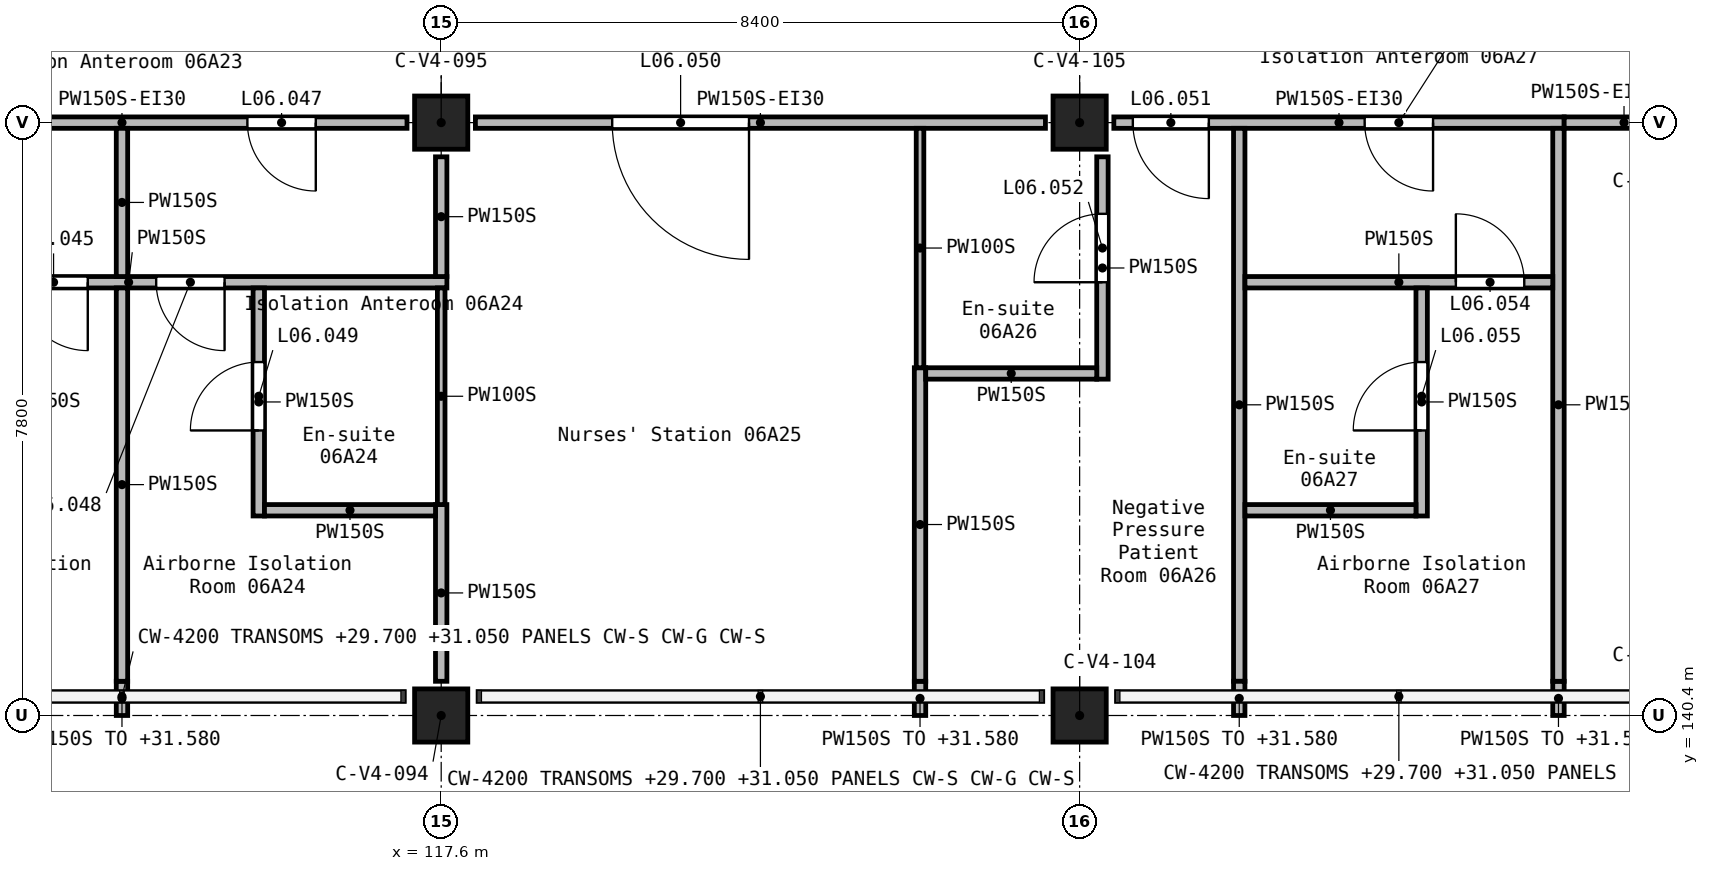
"""IFC4 building model, lengths in metres.
Left out: names, types, materials, properties, quantities, classifications, styles, units other than length and angle.
Written with IfcOpenShell. Run it as: python <this file> out.ifc"""

import sys

from ifc_helpers import new_model, si_unit, direction, frame, frame_2d, origin, origin_2d, place, context, subcontext, project, spatial, rectangle, extrude, element, fill, save


model = new_model("IFC4")
c1 = context("Model", 3, precision=1e-05, world=origin(), true_north=direction((0.0, 1.0)))
c2 = subcontext(c1, "Body", "Model", "MODEL_VIEW")
j1 = project(units=[si_unit("LENGTHUNIT", "METRE"), si_unit("PLANEANGLEUNIT", "RADIAN")], contexts=[c1])
p1 = place(None, origin())
s1 = spatial("IfcSite", under=j1, at=p1, CompositionType="ELEMENT")
p2 = place(p1, origin())
s2 = spatial("IfcBuilding", under=s1, at=p2, CompositionType="ELEMENT")
p3 = place(p2, frame((0.0, 0.0, 28.8)))
s3 = spatial("IfcBuildingStorey", under=s2, at=p3, CompositionType="ELEMENT", Elevation=28.8)
for number, where, z_axis, x_axis in (
    (1, (117.6, 140.4, 0.0), (0.0, 0.0, 1.0), (1.0, 0.0, 0.0)),
    (2, (117.6, 148.2, 0.0), (0.0, 0.0, 1.0), (1.0, 0.0, 0.0)),
    (3, (126.0, 140.4, 0.0), (0.0, 0.0, 1.0), (1.0, 0.0, 0.0)),
    (4, (126.0, 148.2, 0.0), (0.0, 0.0, 1.0), (1.0, 0.0, 0.0)),
):
    element("IfcColumn", number, at=place(p3, frame(where, z_axis=z_axis, x_axis=x_axis)), inside=s3, PredefinedType="COLUMN", context=c2, shape_type="SweptSolid", body=[
        extrude(rectangle(XDim=0.7, YDim=0.7, at=origin_2d()), origin(), (0.0, 0.0, 1.0), 3.9),
    ])
p4 = place(p3, frame((132.375, 148.2, 0.0), z_axis=(0.0, 0.0, 1.0), x_axis=(-1.0, 0.0, 0.0)))
e5 = element("IfcWall", 5, at=p4, inside=s3, PredefinedType="PARTITIONING", context=c2, shape_type="SweptSolid", body=[
    extrude(rectangle(XDim=5.925, YDim=0.15, at=frame_2d((2.962, 0.0))), origin(), (0.0, 0.0, 1.0), 3.6),
])
p5 = place(p4, frame((4.675, 0.0, 0.0)))
e6 = element("IfcOpeningElement", 6, at=p5, cuts=e5, PredefinedType="OPENING", context=c2, shape_type="SweptSolid", body=[
    extrude(rectangle(XDim=1.0, YDim=2.1, at=frame_2d((0.5, 1.05))), frame((0.0, 0.085, 0.0), z_axis=(0.0, -1.0, 0.0), x_axis=(1.0, 0.0, 0.0)), (0.0, 0.0, 1.0), 0.17),
])
p6 = place(p4, frame((1.725, 0.0, 0.0)))
e7 = element("IfcOpeningElement", 7, at=p6, cuts=e5, PredefinedType="OPENING", context=c2, shape_type="SweptSolid", body=[
    extrude(rectangle(XDim=0.9, YDim=2.1, at=frame_2d((0.45, 1.05))), frame((0.0, 0.085, 0.0), z_axis=(0.0, -1.0, 0.0), x_axis=(1.0, 0.0, 0.0)), (0.0, 0.0, 1.0), 0.17),
])
p7 = place(p3, frame((125.55, 148.2, 0.0), z_axis=(0.0, 0.0, 1.0), x_axis=(-1.0, 0.0, 0.0)))
e8 = element("IfcWall", 8, at=p7, inside=s3, PredefinedType="PARTITIONING", context=c2, shape_type="SweptSolid", body=[
    extrude(rectangle(XDim=7.5, YDim=0.15, at=frame_2d((3.75, 0.0))), origin(), (0.0, 0.0, 1.0), 3.6),
])
p8 = place(p7, frame((3.9, 0.0, 0.0)))
e9 = element("IfcOpeningElement", 9, at=p8, cuts=e8, PredefinedType="OPENING", context=c2, shape_type="SweptSolid", body=[
    extrude(rectangle(XDim=1.8, YDim=2.1, at=frame_2d((0.9, 1.05))), frame((0.0, 0.085, 0.0), z_axis=(0.0, -1.0, 0.0), x_axis=(1.0, 0.0, 0.0)), (0.0, 0.0, 1.0), 0.17),
])
p9 = place(p3, frame((117.15, 148.2, 0.0), z_axis=(0.0, 0.0, 1.0), x_axis=(-1.0, 0.0, 0.0)))
e10 = element("IfcWall", 10, at=p9, inside=s3, PredefinedType="PARTITIONING", context=c2, shape_type="SweptSolid", body=[
    extrude(rectangle(XDim=7.5, YDim=0.15, at=frame_2d((3.75, 0.0))), origin(), (0.0, 0.0, 1.0), 3.6),
])
p10 = place(p9, frame((5.4, 0.0, 0.0)))
e11 = element("IfcOpeningElement", 11, at=p10, cuts=e10, PredefinedType="OPENING", context=c2, shape_type="SweptSolid", body=[
    extrude(rectangle(XDim=0.9, YDim=2.1, at=frame_2d((0.45, 1.05))), frame((0.0, 0.085, 0.0), z_axis=(0.0, -1.0, 0.0), x_axis=(1.0, 0.0, 0.0)), (0.0, 0.0, 1.0), 0.17),
])
p11 = place(p9, frame((1.2, 0.0, 0.0)))
e12 = element("IfcOpeningElement", 12, at=p11, cuts=e10, PredefinedType="OPENING", context=c2, shape_type="SweptSolid", body=[
    extrude(rectangle(XDim=0.9, YDim=2.1, at=frame_2d((0.45, 1.05))), frame((0.0, 0.085, 0.0), z_axis=(0.0, -1.0, 0.0), x_axis=(1.0, 0.0, 0.0)), (0.0, 0.0, 1.0), 0.17),
])
p12 = place(p3, frame((132.375, 148.2, 0.0), z_axis=(0.0, 0.0, 1.0), x_axis=(1.0, 0.0, 0.0)))
e13 = element("IfcWall", 13, at=p12, inside=s3, PredefinedType="PARTITIONING", context=c2, shape_type="SweptSolid", body=[
    extrude(rectangle(XDim=1.575, YDim=0.15, at=frame_2d((0.788, 0.0))), origin(), (0.0, 0.0, 1.0), 3.6),
])
p13 = place(p3, frame((117.675, 146.1, 0.0), z_axis=(0.0, 0.0, 1.0), x_axis=(-1.0, 0.0, 0.0)))
e14 = element("IfcWall", 14, at=p13, inside=s3, PredefinedType="PARTITIONING", context=c2, shape_type="SweptSolid", body=[
    extrude(rectangle(XDim=8.375, YDim=0.15, at=frame_2d((4.188, 0.0))), origin(), (0.0, 0.0, 1.0), 3.6),
])
p14 = place(p13, frame((4.725, 0.0, 0.0)))
e15 = element("IfcOpeningElement", 15, at=p14, cuts=e14, PredefinedType="OPENING", context=c2, shape_type="SweptSolid", body=[
    extrude(rectangle(XDim=0.9, YDim=2.1, at=frame_2d((0.45, 1.05))), frame((0.0, 0.085, 0.0), z_axis=(0.0, -1.0, 0.0), x_axis=(1.0, 0.0, 0.0)), (0.0, 0.0, 1.0), 0.17),
])
p15 = place(p13, frame((2.925, 0.0, 0.0)))
e16 = element("IfcOpeningElement", 16, at=p15, cuts=e14, PredefinedType="OPENING", context=c2, shape_type="SweptSolid", body=[
    extrude(rectangle(XDim=0.9, YDim=2.1, at=frame_2d((0.45, 1.05))), frame((0.0, 0.085, 0.0), z_axis=(0.0, -1.0, 0.0), x_axis=(1.0, 0.0, 0.0)), (0.0, 0.0, 1.0), 0.17),
])
p16 = place(p3, frame((113.4, 140.4, 0.0), z_axis=(0.0, 0.0, 1.0), x_axis=(0.0, 1.0, 0.0)))
e17 = element("IfcWall", 17, at=p16, inside=s3, PredefinedType="PARTITIONING", context=c2, shape_type="SweptSolid", body=[
    extrude(rectangle(XDim=0.45, YDim=0.15, at=frame_2d((0.225, 0.0))), origin(), (0.0, 0.0, 1.0), 2.78),
])
p17 = place(p3, frame((113.4, 140.85, 0.0), z_axis=(0.0, 0.0, 1.0), x_axis=(0.0, 1.0, 0.0)))
e18 = element("IfcWall", 18, at=p17, inside=s3, PredefinedType="PARTITIONING", context=c2, shape_type="SweptSolid", body=[
    extrude(rectangle(XDim=5.175, YDim=0.15, at=frame_2d((2.587, 0.0))), origin(), (0.0, 0.0, 1.0), 3.6),
])
p18 = place(p3, frame((113.4, 146.175, 0.0), z_axis=(0.0, 0.0, 1.0), x_axis=(0.0, 1.0, 0.0)))
e19 = element("IfcWall", 19, at=p18, inside=s3, PredefinedType="PARTITIONING", context=c2, shape_type="SweptSolid", body=[
    extrude(rectangle(XDim=1.95, YDim=0.15, at=frame_2d((0.975, 0.0))), origin(), (0.0, 0.0, 1.0), 3.6),
])
p19 = place(p3, frame((128.1, 148.125, 0.0), z_axis=(0.0, 0.0, 1.0), x_axis=(0.0, -1.0, 0.0)))
e20 = element("IfcWall", 20, at=p19, inside=s3, PredefinedType="PARTITIONING", context=c2, shape_type="SweptSolid", body=[
    extrude(rectangle(XDim=7.275, YDim=0.15, at=frame_2d((3.637, 0.0))), origin(), (0.0, 0.0, 1.0), 3.6),
])
for number, where, z_axis, x_axis in (
    (21, (128.1, 140.85, 0.0), (0.0, 0.0, 1.0), (0.0, -1.0, 0.0)),
    (22, (132.3, 140.4, 0.0), (0.0, 0.0, 1.0), (0.0, 1.0, 0.0)),
):
    element("IfcWall", number, at=place(p3, frame(where, z_axis=z_axis, x_axis=x_axis)), inside=s3, PredefinedType="PARTITIONING", context=c2, shape_type="SweptSolid", body=[
        extrude(rectangle(XDim=0.45, YDim=0.15, at=frame_2d((0.225, 0.0))), origin(), (0.0, 0.0, 1.0), 2.78),
    ])
p20 = place(p3, frame((132.3, 140.85, 0.0), z_axis=(0.0, 0.0, 1.0), x_axis=(0.0, 1.0, 0.0)))
e23 = element("IfcWall", 23, at=p20, inside=s3, PredefinedType="PARTITIONING", context=c2, shape_type="SweptSolid", body=[
    extrude(rectangle(XDim=7.275, YDim=0.15, at=frame_2d((3.637, 0.0))), origin(), (0.0, 0.0, 1.0), 3.6),
])
p21 = place(p3, frame((123.9, 140.4, 0.0), z_axis=(0.0, 0.0, 1.0), x_axis=(0.0, 1.0, 0.0)))
e24 = element("IfcWall", 24, at=p21, inside=s3, PredefinedType="PARTITIONING", context=c2, shape_type="SweptSolid", body=[
    extrude(rectangle(XDim=0.45, YDim=0.15, at=frame_2d((0.225, 0.0))), origin(), (0.0, 0.0, 1.0), 2.78),
])
p22 = place(p3, frame((123.9, 140.85, 0.0), z_axis=(0.0, 0.0, 1.0), x_axis=(0.0, 1.0, 0.0)))
e25 = element("IfcWall", 25, at=p22, inside=s3, PredefinedType="PARTITIONING", context=c2, shape_type="SweptSolid", body=[
    extrude(rectangle(XDim=4.125, YDim=0.15, at=frame_2d((2.062, 0.0))), origin(), (0.0, 0.0, 1.0), 3.6),
])
p23 = place(p3, frame((128.175, 146.1, 0.0), z_axis=(0.0, 0.0, 1.0), x_axis=(1.0, 0.0, 0.0)))
e26 = element("IfcWall", 26, at=p23, inside=s3, PredefinedType="PARTITIONING", context=c2, shape_type="SweptSolid", body=[
    extrude(rectangle(XDim=4.05, YDim=0.15, at=frame_2d((2.025, 0.0))), origin(), (0.0, 0.0, 1.0), 3.6),
])
p24 = place(p23, frame((2.775, 0.0, 0.0)))
e27 = element("IfcOpeningElement", 27, at=p24, cuts=e26, PredefinedType="OPENING", context=c2, shape_type="SweptSolid", body=[
    extrude(rectangle(XDim=0.9, YDim=2.1, at=frame_2d((0.45, 1.05))), frame((0.0, 0.085, 0.0), z_axis=(0.0, -1.0, 0.0), x_axis=(1.0, 0.0, 0.0)), (0.0, 0.0, 1.0), 0.17),
])
p25 = place(p3, frame((126.3, 144.825, 0.0), z_axis=(0.0, 0.0, 1.0), x_axis=(0.0, 1.0, 0.0)))
e28 = element("IfcWall", 28, at=p25, inside=s3, PredefinedType="PARTITIONING", context=c2, shape_type="SweptSolid", body=[
    extrude(rectangle(XDim=2.925, YDim=0.15, at=frame_2d((1.462, 0.0))), origin(), (0.0, 0.0, 1.0), 3.6),
])
p26 = place(p25, frame((1.275, 0.0, 0.0)))
e29 = element("IfcOpeningElement", 29, at=p26, cuts=e28, PredefinedType="OPENING", context=c2, shape_type="SweptSolid", body=[
    extrude(rectangle(XDim=0.9, YDim=2.1, at=frame_2d((0.45, 1.05))), frame((0.0, 0.085, 0.0), z_axis=(0.0, -1.0, 0.0), x_axis=(1.0, 0.0, 0.0)), (0.0, 0.0, 1.0), 0.17),
])
p27 = place(p3, frame((115.2, 143.025, 0.0), z_axis=(0.0, 0.0, 1.0), x_axis=(0.0, 1.0, 0.0)))
e30 = element("IfcWall", 30, at=p27, inside=s3, PredefinedType="PARTITIONING", context=c2, shape_type="SweptSolid", body=[
    extrude(rectangle(XDim=3.0, YDim=0.15, at=frame_2d((1.5, 0.0))), origin(), (0.0, 0.0, 1.0), 3.6),
])
p28 = place(p27, frame((1.125, 0.0, 0.0)))
e31 = element("IfcOpeningElement", 31, at=p28, cuts=e30, PredefinedType="OPENING", context=c2, shape_type="SweptSolid", body=[
    extrude(rectangle(XDim=0.9, YDim=2.1, at=frame_2d((0.45, 1.05))), frame((0.0, 0.085, 0.0), z_axis=(0.0, -1.0, 0.0), x_axis=(1.0, 0.0, 0.0)), (0.0, 0.0, 1.0), 0.17),
])
p29 = place(p3, frame((130.5, 143.025, 0.0), z_axis=(0.0, 0.0, 1.0), x_axis=(0.0, 1.0, 0.0)))
e32 = element("IfcWall", 32, at=p29, inside=s3, PredefinedType="PARTITIONING", context=c2, shape_type="SweptSolid", body=[
    extrude(rectangle(XDim=3.0, YDim=0.15, at=frame_2d((1.5, 0.0))), origin(), (0.0, 0.0, 1.0), 3.6),
])
p30 = place(p29, frame((1.125, 0.0, 0.0)))
e33 = element("IfcOpeningElement", 33, at=p30, cuts=e32, PredefinedType="OPENING", context=c2, shape_type="SweptSolid", body=[
    extrude(rectangle(XDim=0.9, YDim=2.1, at=frame_2d((0.45, 1.05))), frame((0.0, 0.085, 0.0), z_axis=(0.0, -1.0, 0.0), x_axis=(1.0, 0.0, 0.0)), (0.0, 0.0, 1.0), 0.17),
])
p31 = place(p3, frame((117.6, 140.85, 0.0), z_axis=(0.0, 0.0, 1.0), x_axis=(0.0, 1.0, 0.0)))
e34 = element("IfcWall", 34, at=p31, inside=s3, PredefinedType="PARTITIONING", context=c2, shape_type="SweptSolid", body=[
    extrude(rectangle(XDim=2.325, YDim=0.15, at=frame_2d((1.163, 0.0))), origin(), (0.0, 0.0, 1.0), 3.6),
])
for number, where, z_axis, x_axis in (
    (35, (128.175, 143.1, 0.0), (0.0, 0.0, 1.0), (1.0, 0.0, 0.0)),
    (36, (115.275, 143.1, 0.0), (0.0, 0.0, 1.0), (1.0, 0.0, 0.0)),
    (37, (123.975, 144.9, 0.0), (0.0, 0.0, 1.0), (1.0, 0.0, 0.0)),
):
    element("IfcWall", number, at=place(p3, frame(where, z_axis=z_axis, x_axis=x_axis)), inside=s3, PredefinedType="PARTITIONING", context=c2, shape_type="SweptSolid", body=[
        extrude(rectangle(XDim=2.25, YDim=0.15, at=frame_2d((1.125, 0.0))), origin(), (0.0, 0.0, 1.0), 3.6),
    ])
p32 = place(p3, frame((117.6, 146.175, 0.0), z_axis=(0.0, 0.0, 1.0), x_axis=(0.0, 1.0, 0.0)))
e38 = element("IfcWall", 38, at=p32, inside=s3, PredefinedType="PARTITIONING", context=c2, shape_type="SweptSolid", body=[
    extrude(rectangle(XDim=1.575, YDim=0.15, at=frame_2d((0.788, 0.0))), origin(), (0.0, 0.0, 1.0), 3.6),
])
p33 = place(p3, frame((123.9, 144.975, 0.0), z_axis=(0.0, 0.0, 1.0), x_axis=(0.0, 1.0, 0.0)))
e39 = element("IfcWall", 39, at=p33, inside=s3, PredefinedType="PARTITIONING", context=c2, shape_type="SweptSolid", body=[
    extrude(rectangle(XDim=3.15, YDim=0.1, at=frame_2d((1.575, 0.0))), origin(), (0.0, 0.0, 1.0), 3.6),
])
p34 = place(p3, frame((117.6, 143.175, 0.0), z_axis=(0.0, 0.0, 1.0), x_axis=(0.0, 1.0, 0.0)))
e40 = element("IfcWall", 40, at=p34, inside=s3, PredefinedType="PARTITIONING", context=c2, shape_type="SweptSolid", body=[
    extrude(rectangle(XDim=2.85, YDim=0.1, at=frame_2d((1.425, 0.0))), origin(), (0.0, 0.0, 1.0), 3.6),
])
p35 = place(p14, origin())
e41 = element("IfcDoor", 41, at=p35, inside=s3, OperationType="SINGLE_SWING_RIGHT", PredefinedType="DOOR", context=c2, shape_type="SweptSolid", body=[
    extrude(rectangle(XDim=0.9, YDim=2.1, at=frame_2d((0.45, 1.05))), frame((0.0, 0.025, 0.0), z_axis=(0.0, -1.0, 0.0), x_axis=(1.0, 0.0, 0.0)), (0.0, 0.0, 1.0), 0.05),
])
fill(e15, e41)
p36 = place(p11, origin())
e42 = element("IfcDoor", 42, at=p36, inside=s3, OperationType="SINGLE_SWING_LEFT", PredefinedType="DOOR", context=c2, shape_type="SweptSolid", body=[
    extrude(rectangle(XDim=0.9, YDim=2.1, at=frame_2d((0.45, 1.05))), frame((0.0, 0.025, 0.0), z_axis=(0.0, -1.0, 0.0), x_axis=(1.0, 0.0, 0.0)), (0.0, 0.0, 1.0), 0.05),
])
fill(e12, e42)
p37 = place(p15, origin())
e43 = element("IfcDoor", 43, at=p37, inside=s3, OperationType="SINGLE_SWING_LEFT", PredefinedType="DOOR", context=c2, shape_type="SweptSolid", body=[
    extrude(rectangle(XDim=0.9, YDim=2.1, at=frame_2d((0.45, 1.05))), frame((0.0, 0.025, 0.0), z_axis=(0.0, -1.0, 0.0), x_axis=(1.0, 0.0, 0.0)), (0.0, 0.0, 1.0), 0.05),
])
fill(e16, e43)
p38 = place(p28, frame((0.9, 0.0, 0.0), z_axis=(0.0, 0.0, 1.0), x_axis=(-1.0, 0.0, 0.0)))
e44 = element("IfcDoor", 44, at=p38, inside=s3, OperationType="SINGLE_SWING_LEFT", PredefinedType="DOOR", context=c2, shape_type="SweptSolid", body=[
    extrude(rectangle(XDim=0.9, YDim=2.1, at=frame_2d((0.45, 1.05))), frame((0.0, 0.025, 0.0), z_axis=(0.0, -1.0, 0.0), x_axis=(1.0, 0.0, 0.0)), (0.0, 0.0, 1.0), 0.05),
])
fill(e31, e44)
p39 = place(p8, origin())
e45 = element("IfcDoor", 45, at=p39, inside=s3, OperationType="DOUBLE_DOOR_SINGLE_SWING", PredefinedType="DOOR", context=c2, shape_type="SweptSolid", body=[
    extrude(rectangle(XDim=1.8, YDim=2.1, at=frame_2d((0.9, 1.05))), frame((0.0, 0.025, 0.0), z_axis=(0.0, -1.0, 0.0), x_axis=(1.0, 0.0, 0.0)), (0.0, 0.0, 1.0), 0.05),
])
fill(e9, e45)
p40 = place(p5, origin())
e46 = element("IfcDoor", 46, at=p40, inside=s3, OperationType="SINGLE_SWING_RIGHT", PredefinedType="DOOR", context=c2, shape_type="SweptSolid", body=[
    extrude(rectangle(XDim=1.0, YDim=2.1, at=frame_2d((0.5, 1.05))), frame((0.0, 0.025, 0.0), z_axis=(0.0, -1.0, 0.0), x_axis=(1.0, 0.0, 0.0)), (0.0, 0.0, 1.0), 0.05),
])
fill(e6, e46)
p41 = place(p26, origin())
e47 = element("IfcDoor", 47, at=p41, inside=s3, OperationType="SINGLE_SWING_RIGHT", PredefinedType="DOOR", context=c2, shape_type="SweptSolid", body=[
    extrude(rectangle(XDim=0.9, YDim=2.1, at=frame_2d((0.45, 1.05))), frame((0.0, 0.025, 0.0), z_axis=(0.0, -1.0, 0.0), x_axis=(1.0, 0.0, 0.0)), (0.0, 0.0, 1.0), 0.05),
])
fill(e29, e47)
p42 = place(p6, origin())
e48 = element("IfcDoor", 48, at=p42, inside=s3, OperationType="SINGLE_SWING_LEFT", PredefinedType="DOOR", context=c2, shape_type="SweptSolid", body=[
    extrude(rectangle(XDim=0.9, YDim=2.1, at=frame_2d((0.45, 1.05))), frame((0.0, 0.025, 0.0), z_axis=(0.0, -1.0, 0.0), x_axis=(1.0, 0.0, 0.0)), (0.0, 0.0, 1.0), 0.05),
])
fill(e7, e48)
p43 = place(p24, frame((0.9, 0.0, 0.0), z_axis=(0.0, 0.0, 1.0), x_axis=(-1.0, 0.0, 0.0)))
e49 = element("IfcDoor", 49, at=p43, inside=s3, OperationType="SINGLE_SWING_LEFT", PredefinedType="DOOR", context=c2, shape_type="SweptSolid", body=[
    extrude(rectangle(XDim=0.9, YDim=2.1, at=frame_2d((0.45, 1.05))), frame((0.0, 0.025, 0.0), z_axis=(0.0, -1.0, 0.0), x_axis=(1.0, 0.0, 0.0)), (0.0, 0.0, 1.0), 0.05),
])
fill(e27, e49)
p44 = place(p30, origin())
e50 = element("IfcDoor", 50, at=p44, inside=s3, OperationType="SINGLE_SWING_RIGHT", PredefinedType="DOOR", context=c2, shape_type="SweptSolid", body=[
    extrude(rectangle(XDim=0.9, YDim=2.1, at=frame_2d((0.45, 1.05))), frame((0.0, 0.025, 0.0), z_axis=(0.0, -1.0, 0.0), x_axis=(1.0, 0.0, 0.0)), (0.0, 0.0, 1.0), 0.05),
])
fill(e33, e50)
save(model, sys.argv[1])
